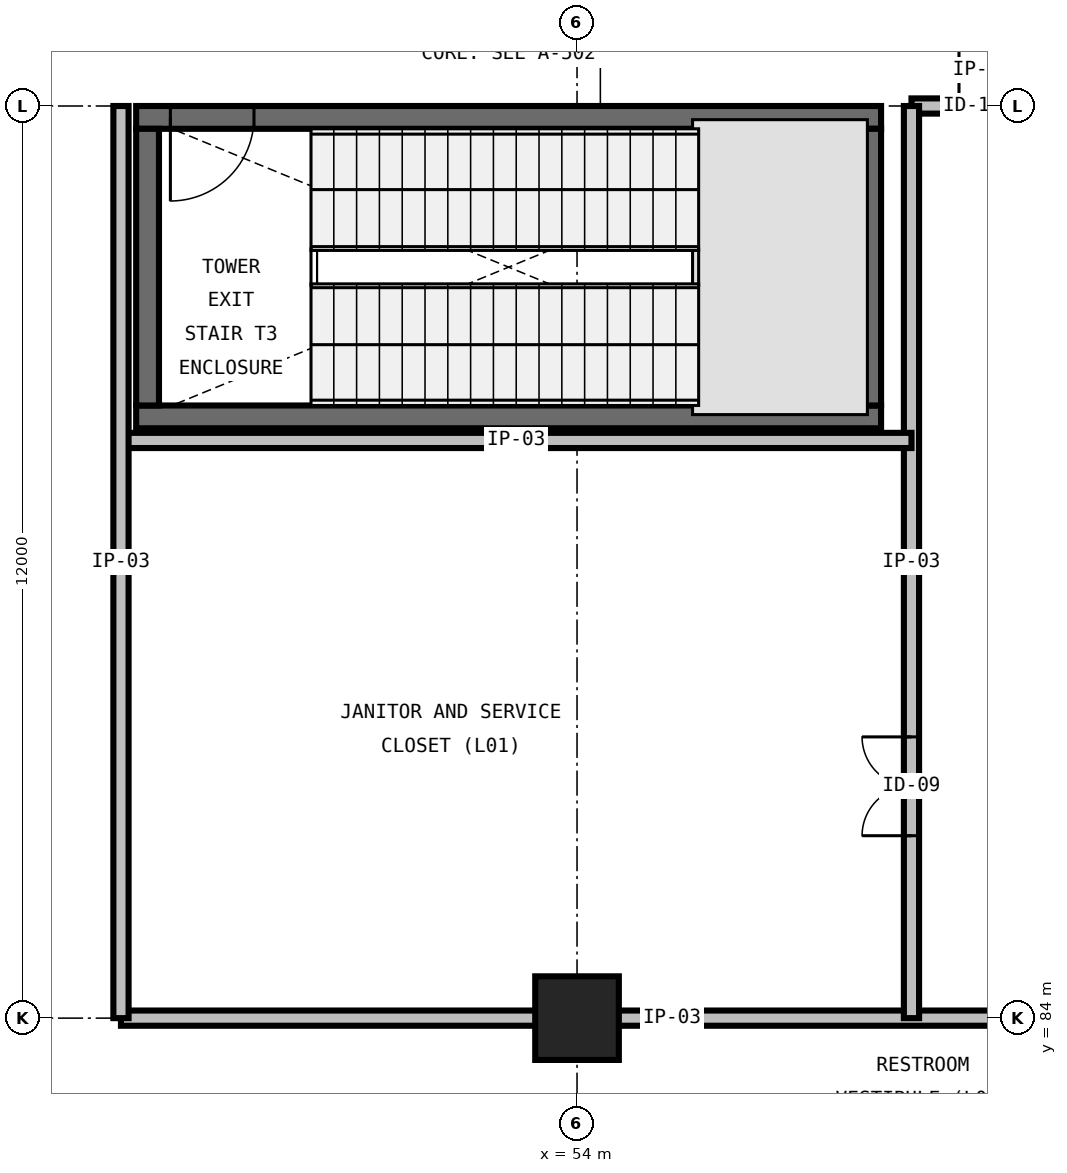
"""IFC4 building model, lengths in metres.
Left out: names, types, materials, properties, quantities, classifications, styles, units other than length and angle.
Written with IfcOpenShell. Run it as: python <this file> out.ifc"""

import sys

from ifc_helpers import new_model, si_unit, direction, frame, frame_2d, origin, origin_2d, place, context, subcontext, project, spatial, rectangle, extrude, element, fill, save


model = new_model("IFC4")
c1 = context("Model", 3, precision=1e-05, world=origin(), true_north=direction((0.0, 1.0)))
c2 = subcontext(c1, "Body", "Model", "MODEL_VIEW")
j1 = project(units=[si_unit("LENGTHUNIT", "METRE"), si_unit("PLANEANGLEUNIT", "RADIAN")], contexts=[c1])
p1 = place(None, origin())
s1 = spatial("IfcSite", under=j1, at=p1, CompositionType="ELEMENT")
p2 = place(p1, origin())
s2 = spatial("IfcBuilding", under=s1, at=p2, CompositionType="ELEMENT")
p3 = place(p2, frame((0.0, 0.0, 6.0)))
s3 = spatial("IfcBuildingStorey", under=s2, at=p3, CompositionType="ELEMENT", Elevation=6.0)
p4 = place(p3, frame((54.0, 84.0, 0.0), z_axis=(0.0, 0.0, 1.0), x_axis=(1.0, 0.0, 0.0)))
e1 = element("IfcColumn", 1, at=p4, inside=s3, PredefinedType="COLUMN", context=c2, shape_type="SweptSolid", body=[
    extrude(rectangle(XDim=1.1, YDim=1.1, at=origin_2d()), origin(), (0.0, 0.0, 1.0), 6.0),
])
p5 = place(p3, frame((48.2, 91.91, 0.0), z_axis=(0.0, 0.0, 1.0), x_axis=(1.0, 0.0, 0.0)))
e2 = element("IfcWall", 2, at=p5, inside=s3, PredefinedType="SHEAR", context=c2, shape_type="SweptSolid", body=[
    extrude(rectangle(XDim=9.8, YDim=0.3, at=frame_2d((4.9, 0.0))), origin(), (0.0, 0.0, 1.0), 6.0),
])
p6 = place(p3, frame((58.0, 95.85, 0.0), z_axis=(0.0, 0.0, 1.0), x_axis=(-1.0, 0.0, 0.0)))
e3 = element("IfcWall", 3, at=p6, inside=s3, PredefinedType="SHEAR", context=c2, shape_type="SweptSolid", body=[
    extrude(rectangle(XDim=9.8, YDim=0.3, at=frame_2d((4.9, 0.0))), origin(), (0.0, 0.0, 1.0), 6.0),
])
p7 = place(p6, frame((8.25, 0.0, 0.0)))
e4 = element("IfcOpeningElement", 4, at=p7, cuts=e3, PredefinedType="OPENING", context=c2, shape_type="SweptSolid", body=[
    extrude(rectangle(XDim=1.1, YDim=2.2, at=frame_2d((0.55, 1.1))), frame((0.0, 0.165, 0.0), z_axis=(0.0, -1.0, 0.0), x_axis=(1.0, 0.0, 0.0)), (0.0, 0.0, 1.0), 0.33),
])
for number, where, z_axis, x_axis in (
    (5, (48.35, 95.7, 0.0), (0.0, 0.0, 1.0), (0.0, -1.0, 0.0)),
    (6, (57.85, 92.06, 0.0), (0.0, 0.0, 1.0), (0.0, 1.0, 0.0)),
):
    element("IfcWall", number, at=place(p3, frame(where, z_axis=z_axis, x_axis=x_axis)), inside=s3, PredefinedType="SHEAR", context=c2, shape_type="SweptSolid", body=[
        extrude(rectangle(XDim=3.64, YDim=0.3, at=frame_2d((1.82, 0.0))), origin(), (0.0, 0.0, 1.0), 6.0),
    ])
p8 = place(p3, frame((48.0, 84.0, 0.0), z_axis=(0.0, 0.0, 1.0), x_axis=(1.0, 0.0, 0.0)))
e7 = element("IfcWall", 7, at=p8, inside=s3, PredefinedType="PARTITIONING", context=c2, shape_type="SweptSolid", body=[
    extrude(rectangle(XDim=18.0, YDim=0.2, at=frame_2d((9.0, 0.0))), origin(), (0.0, 0.0, 1.0), 4.902),
])
p9 = place(p3, frame((58.4, 96.0, 0.0), z_axis=(0.0, 0.0, 1.0), x_axis=(1.0, 0.0, 0.0)))
e8 = element("IfcWall", 8, at=p9, inside=s3, PredefinedType="PARTITIONING", context=c2, shape_type="SweptSolid", body=[
    extrude(rectangle(XDim=2.4, YDim=0.2, at=frame_2d((1.2, 0.0))), origin(), (0.0, 0.0, 1.0), 4.749),
])
p10 = place(p9, frame((0.625, 0.0, 0.0)))
e9 = element("IfcOpeningElement", 9, at=p10, cuts=e8, PredefinedType="OPENING", context=c2, shape_type="SweptSolid", body=[
    extrude(rectangle(XDim=0.95, YDim=2.15, at=frame_2d((0.475, 1.075))), frame((0.0, 0.115, 0.0), z_axis=(0.0, -1.0, 0.0), x_axis=(1.0, 0.0, 0.0)), (0.0, 0.0, 1.0), 0.23),
])
p11 = place(p3, frame((58.4, 84.0, 0.0), z_axis=(0.0, 0.0, 1.0), x_axis=(0.0, 1.0, 0.0)))
e10 = element("IfcWall", 10, at=p11, inside=s3, PredefinedType="PARTITIONING", context=c2, shape_type="SweptSolid", body=[
    extrude(rectangle(XDim=12.0, YDim=0.2, at=frame_2d((6.0, 0.0))), origin(), (0.0, 0.0, 1.0), 5.68),
])
p12 = place(p11, frame((2.4, 0.0, 0.0)))
e11 = element("IfcOpeningElement", 11, at=p12, cuts=e10, PredefinedType="OPENING", context=c2, shape_type="SweptSolid", body=[
    extrude(rectangle(XDim=1.3, YDim=2.2, at=frame_2d((0.65, 1.1))), frame((0.0, 0.115, 0.0), z_axis=(0.0, -1.0, 0.0), x_axis=(1.0, 0.0, 0.0)), (0.0, 0.0, 1.0), 0.23),
])
p13 = place(p3, frame((48.0, 91.6, 0.0), z_axis=(0.0, 0.0, 1.0), x_axis=(1.0, 0.0, 0.0)))
e12 = element("IfcWall", 12, at=p13, inside=s3, PredefinedType="PARTITIONING", context=c2, shape_type="SweptSolid", body=[
    extrude(rectangle(XDim=10.4, YDim=0.2, at=frame_2d((5.2, 0.0))), origin(), (0.0, 0.0, 1.0), 5.68),
])
p14 = place(p3, frame((48.0, 84.0, 0.0), z_axis=(0.0, 0.0, 1.0), x_axis=(0.0, 1.0, 0.0)))
e13 = element("IfcWall", 13, at=p14, inside=s3, PredefinedType="PARTITIONING", context=c2, shape_type="SweptSolid", body=[
    extrude(rectangle(XDim=12.0, YDim=0.2, at=frame_2d((6.0, 0.0))), origin(), (0.0, 0.0, 1.0), 5.68),
])
p15 = place(p7, origin())
e14 = element("IfcDoor", 14, at=p15, inside=s3, OperationType="SINGLE_SWING_RIGHT", PredefinedType="DOOR", context=c2, shape_type="SweptSolid", body=[
    extrude(rectangle(XDim=1.1, YDim=2.2, at=frame_2d((0.55, 1.1))), frame((0.0, 0.025, 0.0), z_axis=(0.0, -1.0, 0.0), x_axis=(1.0, 0.0, 0.0)), (0.0, 0.0, 1.0), 0.05),
])
fill(e4, e14)
p16 = place(p10, origin())
e15 = element("IfcDoor", 15, at=p16, inside=s3, OperationType="SINGLE_SWING_LEFT", PredefinedType="DOOR", context=c2, shape_type="SweptSolid", body=[
    extrude(rectangle(XDim=0.95, YDim=2.15, at=frame_2d((0.475, 1.075))), frame((0.0, 0.025, 0.0), z_axis=(0.0, -1.0, 0.0), x_axis=(1.0, 0.0, 0.0)), (0.0, 0.0, 1.0), 0.05),
])
fill(e9, e15)
p17 = place(p12, origin())
e16 = element("IfcDoor", 16, at=p17, inside=s3, OperationType="DOUBLE_DOOR_SINGLE_SWING", PredefinedType="DOOR", context=c2, shape_type="SweptSolid", body=[
    extrude(rectangle(XDim=1.3, YDim=2.2, at=frame_2d((0.65, 1.1))), frame((0.0, 0.025, 0.0), z_axis=(0.0, -1.0, 0.0), x_axis=(1.0, 0.0, 0.0)), (0.0, 0.0, 1.0), 0.05),
])
fill(e11, e16)
save(model, sys.argv[1])
